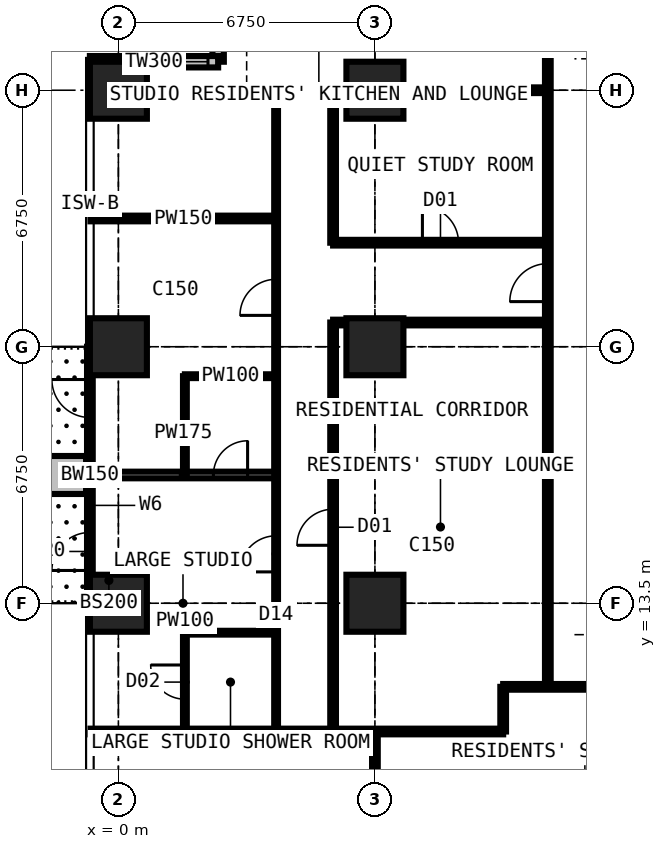
"""IFC4 building model, lengths in metres.
Left out: names, types, materials, properties, quantities, classifications, styles, units other than length and angle.
Written with IfcOpenShell. Run it as: python <this file> out.ifc"""

import sys

from ifc_helpers import new_model, si_unit, direction, frame, frame_2d, origin, origin_2d, place, context, subcontext, project, spatial, rectangle, extrude, element, fill, save


model = new_model("IFC4")
c1 = context("Model", 3, precision=1e-05, world=origin(), true_north=direction((0.0, 1.0)))
c2 = subcontext(c1, "Body", "Model", "MODEL_VIEW")
j1 = project(units=[si_unit("LENGTHUNIT", "METRE"), si_unit("PLANEANGLEUNIT", "RADIAN")], contexts=[c1])
p1 = place(None, origin())
s1 = spatial("IfcSite", under=j1, at=p1, CompositionType="ELEMENT")
p2 = place(p1, origin())
s2 = spatial("IfcBuilding", under=s1, at=p2, CompositionType="ELEMENT")
p3 = place(p2, frame((0.0, 0.0, 123.3)))
s3 = spatial("IfcBuildingStorey", under=s2, at=p3, CompositionType="ELEMENT", Elevation=123.3)
for number, where, z_axis, x_axis in (
    (1, (0.0, 13.5, 0.0), (0.0, 0.0, 1.0), (1.0, 0.0, 0.0)),
    (2, (0.0, 20.25, 0.0), (0.0, 0.0, 1.0), (1.0, 0.0, 0.0)),
    (3, (0.0, 27.0, 0.0), (0.0, 0.0, 1.0), (1.0, 0.0, 0.0)),
    (4, (6.75, 13.5, 0.0), (0.0, 0.0, 1.0), (1.0, 0.0, 0.0)),
    (5, (6.75, 20.25, 0.0), (0.0, 0.0, 1.0), (1.0, 0.0, 0.0)),
    (6, (6.75, 27.0, 0.0), (0.0, 0.0, 1.0), (1.0, 0.0, 0.0)),
):
    element("IfcColumn", number, at=place(p3, frame(where, z_axis=z_axis, x_axis=x_axis)), inside=s3, PredefinedType="COLUMN", context=c2, shape_type="SweptSolid", body=[
        extrude(rectangle(XDim=1.5, YDim=1.5, at=origin_2d()), origin(), (0.0, 0.0, 1.0), 3.6),
    ])
p4 = place(p3, frame((2.625, 31.125, 0.0), z_axis=(0.0, 0.0, 1.0), x_axis=(0.0, -1.0, 0.0)))
e7 = element("IfcWall", 7, at=p4, inside=s3, PredefinedType="SOLIDWALL", context=c2, shape_type="SweptSolid", body=[
    extrude(rectangle(XDim=3.375, YDim=0.3, at=frame_2d((1.688, 0.0))), origin(), (0.0, 0.0, 1.0), 3.375),
])
p5 = place(p4, frame((0.788, 0.0, 0.6)))
e8 = element("IfcOpeningElement", 8, at=p5, cuts=e7, PredefinedType="OPENING", context=c2, shape_type="SweptSolid", body=[
    extrude(rectangle(XDim=1.8, YDim=2.1, at=frame_2d((0.9, 1.05))), frame((0.0, 0.16, 0.0), z_axis=(0.0, -1.0, 0.0), x_axis=(1.0, 0.0, 0.0)), (0.0, 0.0, 1.0), 0.32),
])
p6 = place(p3, frame((2.625, 27.75, 0.0), z_axis=(0.0, 0.0, 1.0), x_axis=(-1.0, 0.0, 0.0)))
e9 = element("IfcWall", 9, at=p6, inside=s3, PredefinedType="SOLIDWALL", context=c2, shape_type="SweptSolid", body=[
    extrude(rectangle(XDim=3.375, YDim=0.3, at=frame_2d((1.688, 0.0))), origin(), (0.0, 0.0, 1.0), 3.375),
])
p7 = place(p6, frame((0.268, 0.0, 0.9)))
e10 = element("IfcOpeningElement", 10, at=p7, cuts=e9, PredefinedType="OPENING", context=c2, shape_type="SweptSolid", body=[
    extrude(rectangle(XDim=1.5, YDim=1.8, at=frame_2d((0.75, 0.9))), frame((0.0, 0.16, 0.0), z_axis=(0.0, -1.0, 0.0), x_axis=(1.0, 0.0, 0.0)), (0.0, 0.0, 1.0), 0.32),
])
p8 = place(p3, frame((-0.75, 13.5, 0.0), z_axis=(0.0, 0.0, 1.0), x_axis=(0.0, 1.0, 0.0)))
e11 = element("IfcWall", 11, at=p8, inside=s3, PredefinedType="SOLIDWALL", context=c2, shape_type="SweptSolid", body=[
    extrude(rectangle(XDim=6.75, YDim=0.15, at=frame_2d((3.375, 0.0))), origin(), (0.0, 0.0, 1.0), 3.375),
])
p9 = place(p8, frame((0.863, 0.0, 0.0)))
e12 = element("IfcOpeningElement", 12, at=p9, cuts=e11, PredefinedType="OPENING", context=c2, shape_type="SweptSolid", body=[
    extrude(rectangle(XDim=1.0, YDim=2.2, at=frame_2d((0.5, 1.1))), frame((0.0, 0.085, 0.0), z_axis=(0.0, -1.0, 0.0), x_axis=(1.0, 0.0, 0.0)), (0.0, 0.0, 1.0), 0.17),
])
p10 = place(p8, frame((1.975, 0.0, 0.9)))
e13 = element("IfcOpeningElement", 13, at=p10, cuts=e11, PredefinedType="OPENING", context=c2, shape_type="SweptSolid", body=[
    extrude(rectangle(XDim=1.2, YDim=1.8, at=frame_2d((0.6, 0.9))), frame((0.0, 0.085, 0.0), z_axis=(0.0, -1.0, 0.0), x_axis=(1.0, 0.0, 0.0)), (0.0, 0.0, 1.0), 0.17),
])
p11 = place(p8, frame((4.887, 0.0, 0.0)))
e14 = element("IfcOpeningElement", 14, at=p11, cuts=e11, PredefinedType="OPENING", context=c2, shape_type="SweptSolid", body=[
    extrude(rectangle(XDim=1.0, YDim=2.2, at=frame_2d((0.5, 1.1))), frame((0.0, 0.085, 0.0), z_axis=(0.0, -1.0, 0.0), x_axis=(1.0, 0.0, 0.0)), (0.0, 0.0, 1.0), 0.17),
])
p12 = place(p8, frame((3.575, 0.0, 0.9)))
e15 = element("IfcOpeningElement", 15, at=p12, cuts=e11, PredefinedType="OPENING", context=c2, shape_type="SweptSolid", body=[
    extrude(rectangle(XDim=1.2, YDim=1.8, at=frame_2d((0.6, 0.9))), frame((0.0, 0.085, 0.0), z_axis=(0.0, -1.0, 0.0), x_axis=(1.0, 0.0, 0.0)), (0.0, 0.0, 1.0), 0.17),
])
p13 = place(p3, frame((-0.85, 16.875, 0.0), z_axis=(0.0, 0.0, 1.0), x_axis=(-1.0, 0.0, 0.0)))
e16 = element("IfcWall", 16, at=p13, inside=s3, PredefinedType="USERDEFINED", context=c2, shape_type="SweptSolid", body=[
    extrude(rectangle(XDim=2.2, YDim=1.0, at=frame_2d((1.1, 0.0))), origin(), (0.0, 0.0, 1.0), 0.9),
])
p14 = place(p3, frame((-0.734, 10.125, 0.0), z_axis=(0.0, 0.0, 1.0), x_axis=(1.0, 0.0, 0.0)))
e17 = element("IfcWall", 17, at=p14, inside=s3, PredefinedType="PARTITIONING", context=c2, shape_type="SweptSolid", body=[
    extrude(rectangle(XDim=10.859, YDim=0.15, at=frame_2d((5.429, 0.0))), origin(), (0.0, 0.0, 1.0), 3.375),
])
p15 = place(p3, frame((-0.734, 16.875, 0.0), z_axis=(0.0, 0.0, 1.0), x_axis=(1.0, 0.0, 0.0)))
e18 = element("IfcWall", 18, at=p15, inside=s3, PredefinedType="PARTITIONING", context=c2, shape_type="SweptSolid", body=[
    extrude(rectangle(XDim=4.884, YDim=0.175, at=frame_2d((2.442, 0.0))), origin(), (0.0, 0.0, 1.0), 3.375),
])
p16 = place(p15, frame((3.234, 0.0, 0.0)))
e19 = element("IfcOpeningElement", 19, at=p16, cuts=e18, PredefinedType="OPENING", context=c2, shape_type="SweptSolid", body=[
    extrude(rectangle(XDim=0.9, YDim=2.2, at=frame_2d((0.45, 1.1))), frame((0.0, 0.097, 0.0), z_axis=(0.0, -1.0, 0.0), x_axis=(1.0, 0.0, 0.0)), (0.0, 0.0, 1.0), 0.195),
])
p17 = place(p3, frame((-0.734, 23.625, 0.0), z_axis=(0.0, 0.0, 1.0), x_axis=(1.0, 0.0, 0.0)))
e20 = element("IfcWall", 20, at=p17, inside=s3, PredefinedType="PARTITIONING", context=c2, shape_type="SweptSolid", body=[
    extrude(rectangle(XDim=4.884, YDim=0.15, at=frame_2d((2.442, 0.0))), origin(), (0.0, 0.0, 1.0), 3.375),
])
p18 = place(p3, frame((1.75, 10.125, 0.0), z_axis=(0.0, 0.0, 1.0), x_axis=(0.0, 1.0, 0.0)))
e21 = element("IfcWall", 21, at=p18, inside=s3, PredefinedType="PARTITIONING", context=c2, shape_type="SweptSolid", body=[
    extrude(rectangle(XDim=2.6, YDim=0.1, at=frame_2d((1.3, 0.0))), origin(), (0.0, 0.0, 1.0), 3.375),
])
p19 = place(p18, frame((0.85, 0.0, 0.0)))
e22 = element("IfcOpeningElement", 22, at=p19, cuts=e21, PredefinedType="OPENING", context=c2, shape_type="SweptSolid", body=[
    extrude(rectangle(XDim=0.9, YDim=2.2, at=frame_2d((0.45, 1.1))), frame((0.0, 0.06, 0.0), z_axis=(0.0, -1.0, 0.0), x_axis=(1.0, 0.0, 0.0)), (0.0, 0.0, 1.0), 0.12),
])
p20 = place(p3, frame((1.75, 12.725, 0.0), z_axis=(0.0, 0.0, 1.0), x_axis=(1.0, 0.0, 0.0)))
e23 = element("IfcWall", 23, at=p20, inside=s3, PredefinedType="PARTITIONING", context=c2, shape_type="SweptSolid", body=[
    extrude(rectangle(XDim=2.4, YDim=0.1, at=frame_2d((1.2, 0.0))), origin(), (0.0, 0.0, 1.0), 3.375),
])
p21 = place(p3, frame((1.75, 16.875, 0.0), z_axis=(0.0, 0.0, 1.0), x_axis=(0.0, 1.0, 0.0)))
e24 = element("IfcWall", 24, at=p21, inside=s3, PredefinedType="PARTITIONING", context=c2, shape_type="SweptSolid", body=[
    extrude(rectangle(XDim=2.6, YDim=0.1, at=frame_2d((1.3, 0.0))), origin(), (0.0, 0.0, 1.0), 3.375),
])
p22 = place(p3, frame((1.75, 19.475, 0.0), z_axis=(0.0, 0.0, 1.0), x_axis=(1.0, 0.0, 0.0)))
e25 = element("IfcWall", 25, at=p22, inside=s3, PredefinedType="PARTITIONING", context=c2, shape_type="SweptSolid", body=[
    extrude(rectangle(XDim=2.4, YDim=0.1, at=frame_2d((1.2, 0.0))), origin(), (0.0, 0.0, 1.0), 3.375),
])
p23 = place(p3, frame((4.15, 10.125, 0.0), z_axis=(0.0, 0.0, 1.0), x_axis=(0.0, 1.0, 0.0)))
e26 = element("IfcWall", 26, at=p23, inside=s3, PredefinedType="PARTITIONING", context=c2, shape_type="SweptSolid", body=[
    extrude(rectangle(XDim=16.875, YDim=0.1, at=frame_2d((8.438, 0.0))), origin(), (0.0, 0.0, 1.0), 3.375),
])
p24 = place(p23, frame((4.2, 0.0, 0.0)))
e27 = element("IfcOpeningElement", 27, at=p24, cuts=e26, PredefinedType="OPENING", context=c2, shape_type="SweptSolid", body=[
    extrude(rectangle(XDim=0.95, YDim=2.2, at=frame_2d((0.475, 1.1))), frame((0.0, 0.06, 0.0), z_axis=(0.0, -1.0, 0.0), x_axis=(1.0, 0.0, 0.0)), (0.0, 0.0, 1.0), 0.12),
])
p25 = place(p23, frame((10.95, 0.0, 0.0)))
e28 = element("IfcOpeningElement", 28, at=p25, cuts=e26, PredefinedType="OPENING", context=c2, shape_type="SweptSolid", body=[
    extrude(rectangle(XDim=0.95, YDim=2.2, at=frame_2d((0.475, 1.1))), frame((0.0, 0.06, 0.0), z_axis=(0.0, -1.0, 0.0), x_axis=(1.0, 0.0, 0.0)), (0.0, 0.0, 1.0), 0.12),
])
p26 = place(p3, frame((4.15, 27.0, 0.0), z_axis=(0.0, 0.0, 1.0), x_axis=(1.0, 0.0, 0.0)))
e29 = element("IfcWall", 29, at=p26, inside=s3, PredefinedType="PARTITIONING", context=c2, shape_type="SweptSolid", body=[
    extrude(rectangle(XDim=7.15, YDim=0.15, at=frame_2d((3.575, 0.0))), origin(), (0.0, 0.0, 1.0), 2.806),
])
p27 = place(p3, frame((5.65, 10.125, 0.0), z_axis=(0.0, 0.0, 1.0), x_axis=(0.0, 1.0, 0.0)))
e30 = element("IfcWall", 30, at=p27, inside=s3, PredefinedType="PARTITIONING", context=c2, shape_type="SweptSolid", body=[
    extrude(rectangle(XDim=10.762, YDim=0.15, at=frame_2d((5.381, 0.0))), origin(), (0.0, 0.0, 1.0), 3.375),
])
p28 = place(p27, frame((4.9, 0.0, 0.0)))
e31 = element("IfcOpeningElement", 31, at=p28, cuts=e30, PredefinedType="OPENING", context=c2, shape_type="SweptSolid", body=[
    extrude(rectangle(XDim=0.95, YDim=2.2, at=frame_2d((0.475, 1.1))), frame((0.0, 0.085, 0.0), z_axis=(0.0, -1.0, 0.0), x_axis=(1.0, 0.0, 0.0)), (0.0, 0.0, 1.0), 0.17),
])
p29 = place(p3, frame((5.65, 20.887, 0.0), z_axis=(0.0, 0.0, 1.0), x_axis=(1.0, 0.0, 0.0)))
e32 = element("IfcWall", 32, at=p29, inside=s3, PredefinedType="PARTITIONING", context=c2, shape_type="SweptSolid", body=[
    extrude(rectangle(XDim=5.65, YDim=0.15, at=frame_2d((2.825, 0.0))), origin(), (0.0, 0.0, 1.0), 3.375),
])
p30 = place(p3, frame((5.65, 22.988, 0.0), z_axis=(0.0, 0.0, 1.0), x_axis=(0.0, 1.0, 0.0)))
e33 = element("IfcWall", 33, at=p30, inside=s3, PredefinedType="PARTITIONING", context=c2, shape_type="SweptSolid", body=[
    extrude(rectangle(XDim=4.012, YDim=0.15, at=frame_2d((2.006, 0.0))), origin(), (0.0, 0.0, 1.0), 3.375),
])
p31 = place(p3, frame((5.65, 22.988, 0.0), z_axis=(0.0, 0.0, 1.0), x_axis=(1.0, 0.0, 0.0)))
e34 = element("IfcWall", 34, at=p31, inside=s3, PredefinedType="PARTITIONING", context=c2, shape_type="SweptSolid", body=[
    extrude(rectangle(XDim=5.65, YDim=0.15, at=frame_2d((2.825, 0.0))), origin(), (0.0, 0.0, 1.0), 3.375),
])
p32 = place(p31, frame((2.35, 0.0, 0.0)))
e35 = element("IfcOpeningElement", 35, at=p32, cuts=e34, PredefinedType="OPENING", context=c2, shape_type="SweptSolid", body=[
    extrude(rectangle(XDim=0.95, YDim=2.2, at=frame_2d((0.475, 1.1))), frame((0.0, 0.085, 0.0), z_axis=(0.0, -1.0, 0.0), x_axis=(1.0, 0.0, 0.0)), (0.0, 0.0, 1.0), 0.17),
])
p33 = place(p3, frame((6.75, 4.15, 0.0), z_axis=(0.0, 0.0, 1.0), x_axis=(0.0, 1.0, 0.0)))
e36 = element("IfcWall", 36, at=p33, inside=s3, PredefinedType="PARTITIONING", context=c2, shape_type="SweptSolid", body=[
    extrude(rectangle(XDim=5.975, YDim=0.15, at=frame_2d((2.988, 0.0))), origin(), (0.0, 0.0, 1.0), 2.877),
])
p34 = place(p3, frame((10.125, 10.125, 0.0), z_axis=(0.0, 0.0, 1.0), x_axis=(0.0, 1.0, 0.0)))
e37 = element("IfcWall", 37, at=p34, inside=s3, PredefinedType="PARTITIONING", context=c2, shape_type="SweptSolid", body=[
    extrude(rectangle(XDim=1.175, YDim=0.15, at=frame_2d((0.587, 0.0))), origin(), (0.0, 0.0, 1.0), 3.375),
])
p35 = place(p3, frame((10.125, 11.3, 0.0), z_axis=(0.0, 0.0, 1.0), x_axis=(1.0, 0.0, 0.0)))
e38 = element("IfcWall", 38, at=p35, inside=s3, PredefinedType="PARTITIONING", context=c2, shape_type="SweptSolid", body=[
    extrude(rectangle(XDim=20.675, YDim=0.15, at=frame_2d((10.337, 0.0))), origin(), (0.0, 0.0, 1.0), 3.375),
])
p36 = place(p35, frame((8.375, 0.0, 0.0)))
e39 = element("IfcOpeningElement", 39, at=p36, cuts=e38, PredefinedType="OPENING", context=c2, shape_type="SweptSolid", body=[
    extrude(rectangle(XDim=1.0, YDim=2.2, at=frame_2d((0.5, 1.1))), frame((0.0, 0.085, 0.0), z_axis=(0.0, -1.0, 0.0), x_axis=(1.0, 0.0, 0.0)), (0.0, 0.0, 1.0), 0.17),
])
p37 = place(p35, frame((10.975, 0.0, 0.0)))
e40 = element("IfcOpeningElement", 40, at=p37, cuts=e38, PredefinedType="OPENING", context=c2, shape_type="SweptSolid", body=[
    extrude(rectangle(XDim=1.0, YDim=2.2, at=frame_2d((0.5, 1.1))), frame((0.0, 0.085, 0.0), z_axis=(0.0, -1.0, 0.0), x_axis=(1.0, 0.0, 0.0)), (0.0, 0.0, 1.0), 0.17),
])
p38 = place(p35, frame((3.925, 0.0, 0.0)))
e41 = element("IfcOpeningElement", 41, at=p38, cuts=e38, PredefinedType="OPENING", context=c2, shape_type="SweptSolid", body=[
    extrude(rectangle(XDim=0.95, YDim=2.2, at=frame_2d((0.475, 1.1))), frame((0.0, 0.085, 0.0), z_axis=(0.0, -1.0, 0.0), x_axis=(1.0, 0.0, 0.0)), (0.0, 0.0, 1.0), 0.17),
])
p39 = place(p3, frame((11.3, 11.3, 0.0), z_axis=(0.0, 0.0, 1.0), x_axis=(0.0, 1.0, 0.0)))
e42 = element("IfcWall", 42, at=p39, inside=s3, PredefinedType="PARTITIONING", context=c2, shape_type="SweptSolid", body=[
    extrude(rectangle(XDim=19.3, YDim=0.15, at=frame_2d((9.65, 0.0))), origin(), (0.0, 0.0, 1.0), 3.375),
])
p40 = place(p39, frame((18.1, 0.0, 0.0)))
e43 = element("IfcOpeningElement", 43, at=p40, cuts=e42, PredefinedType="OPENING", context=c2, shape_type="SweptSolid", body=[
    extrude(rectangle(XDim=1.0, YDim=2.2, at=frame_2d((0.5, 1.1))), frame((0.0, 0.085, 0.0), z_axis=(0.0, -1.0, 0.0), x_axis=(1.0, 0.0, 0.0)), (0.0, 0.0, 1.0), 0.17),
])
p41 = place(p39, frame((10.137, 0.0, 0.0)))
e44 = element("IfcOpeningElement", 44, at=p41, cuts=e42, PredefinedType="OPENING", context=c2, shape_type="SweptSolid", body=[
    extrude(rectangle(XDim=1.0, YDim=2.2, at=frame_2d((0.5, 1.1))), frame((0.0, 0.085, 0.0), z_axis=(0.0, -1.0, 0.0), x_axis=(1.0, 0.0, 0.0)), (0.0, 0.0, 1.0), 0.17),
])
p42 = place(p7, origin())
e45 = element("IfcWindow", 45, at=p42, inside=s3, PartitioningType="SINGLE_PANEL", PredefinedType="WINDOW", context=c2, shape_type="SweptSolid", body=[
    extrude(rectangle(XDim=1.5, YDim=1.8, at=frame_2d((0.75, 0.9))), frame((0.0, 0.03, 0.0), z_axis=(0.0, -1.0, 0.0), x_axis=(1.0, 0.0, 0.0)), (0.0, 0.0, 1.0), 0.06),
])
fill(e10, e45)
p43 = place(p9, origin())
e46 = element("IfcDoor", 46, at=p43, inside=s3, OperationType="SINGLE_SWING_LEFT", PredefinedType="DOOR", context=c2, shape_type="SweptSolid", body=[
    extrude(rectangle(XDim=1.0, YDim=2.2, at=frame_2d((0.5, 1.1))), frame((0.0, 0.025, 0.0), z_axis=(0.0, -1.0, 0.0), x_axis=(1.0, 0.0, 0.0)), (0.0, 0.0, 1.0), 0.05),
])
fill(e12, e46)
p44 = place(p10, origin())
e47 = element("IfcWindow", 47, at=p44, inside=s3, PartitioningType="SINGLE_PANEL", PredefinedType="WINDOW", context=c2, shape_type="SweptSolid", body=[
    extrude(rectangle(XDim=1.2, YDim=1.8, at=frame_2d((0.6, 0.9))), frame((0.0, 0.03, 0.0), z_axis=(0.0, -1.0, 0.0), x_axis=(1.0, 0.0, 0.0)), (0.0, 0.0, 1.0), 0.06),
])
fill(e13, e47)
p45 = place(p11, origin())
e48 = element("IfcDoor", 48, at=p45, inside=s3, OperationType="SINGLE_SWING_RIGHT", PredefinedType="DOOR", context=c2, shape_type="SweptSolid", body=[
    extrude(rectangle(XDim=1.0, YDim=2.2, at=frame_2d((0.5, 1.1))), frame((0.0, 0.025, 0.0), z_axis=(0.0, -1.0, 0.0), x_axis=(1.0, 0.0, 0.0)), (0.0, 0.0, 1.0), 0.05),
])
fill(e14, e48)
p46 = place(p12, origin())
e49 = element("IfcWindow", 49, at=p46, inside=s3, PartitioningType="SINGLE_PANEL", PredefinedType="WINDOW", context=c2, shape_type="SweptSolid", body=[
    extrude(rectangle(XDim=1.2, YDim=1.8, at=frame_2d((0.6, 0.9))), frame((0.0, 0.03, 0.0), z_axis=(0.0, -1.0, 0.0), x_axis=(1.0, 0.0, 0.0)), (0.0, 0.0, 1.0), 0.06),
])
fill(e15, e49)
p47 = place(p24, origin())
e50 = element("IfcDoor", 50, at=p47, inside=s3, OperationType="SINGLE_SWING_LEFT", PredefinedType="DOOR", context=c2, shape_type="SweptSolid", body=[
    extrude(rectangle(XDim=0.95, YDim=2.2, at=frame_2d((0.475, 1.1))), frame((0.0, 0.025, 0.0), z_axis=(0.0, -1.0, 0.0), x_axis=(1.0, 0.0, 0.0)), (0.0, 0.0, 1.0), 0.05),
])
fill(e27, e50)
p48 = place(p19, origin())
e51 = element("IfcDoor", 51, at=p48, inside=s3, OperationType="SINGLE_SWING_RIGHT", PredefinedType="DOOR", context=c2, shape_type="SweptSolid", body=[
    extrude(rectangle(XDim=0.9, YDim=2.2, at=frame_2d((0.45, 1.1))), frame((0.0, 0.025, 0.0), z_axis=(0.0, -1.0, 0.0), x_axis=(1.0, 0.0, 0.0)), (0.0, 0.0, 1.0), 0.05),
])
fill(e22, e51)
p49 = place(p25, origin())
e52 = element("IfcDoor", 52, at=p49, inside=s3, OperationType="SINGLE_SWING_LEFT", PredefinedType="DOOR", context=c2, shape_type="SweptSolid", body=[
    extrude(rectangle(XDim=0.95, YDim=2.2, at=frame_2d((0.475, 1.1))), frame((0.0, 0.025, 0.0), z_axis=(0.0, -1.0, 0.0), x_axis=(1.0, 0.0, 0.0)), (0.0, 0.0, 1.0), 0.05),
])
fill(e28, e52)
p50 = place(p16, origin())
e53 = element("IfcDoor", 53, at=p50, inside=s3, OperationType="SINGLE_SWING_RIGHT", PredefinedType="DOOR", context=c2, shape_type="SweptSolid", body=[
    extrude(rectangle(XDim=0.9, YDim=2.2, at=frame_2d((0.45, 1.1))), frame((0.0, 0.025, 0.0), z_axis=(0.0, -1.0, 0.0), x_axis=(1.0, 0.0, 0.0)), (0.0, 0.0, 1.0), 0.05),
])
fill(e19, e53)
p51 = place(p41, origin())
e54 = element("IfcDoor", 54, at=p51, inside=s3, OperationType="SINGLE_SWING_LEFT", PredefinedType="DOOR", context=c2, shape_type="SweptSolid", body=[
    extrude(rectangle(XDim=1.0, YDim=2.2, at=frame_2d((0.5, 1.1))), frame((0.0, 0.025, 0.0), z_axis=(0.0, -1.0, 0.0), x_axis=(1.0, 0.0, 0.0)), (0.0, 0.0, 1.0), 0.05),
])
fill(e44, e54)
p52 = place(p28, origin())
e55 = element("IfcDoor", 55, at=p52, inside=s3, OperationType="SINGLE_SWING_LEFT", PredefinedType="DOOR", context=c2, shape_type="SweptSolid", body=[
    extrude(rectangle(XDim=0.95, YDim=2.2, at=frame_2d((0.475, 1.1))), frame((0.0, 0.025, 0.0), z_axis=(0.0, -1.0, 0.0), x_axis=(1.0, 0.0, 0.0)), (0.0, 0.0, 1.0), 0.05),
])
fill(e31, e55)
p53 = place(p32, origin())
e56 = element("IfcDoor", 56, at=p53, inside=s3, OperationType="SINGLE_SWING_LEFT", PredefinedType="DOOR", context=c2, shape_type="SweptSolid", body=[
    extrude(rectangle(XDim=0.95, YDim=2.2, at=frame_2d((0.475, 1.1))), frame((0.0, 0.025, 0.0), z_axis=(0.0, -1.0, 0.0), x_axis=(1.0, 0.0, 0.0)), (0.0, 0.0, 1.0), 0.05),
])
fill(e35, e56)
save(model, sys.argv[1])
